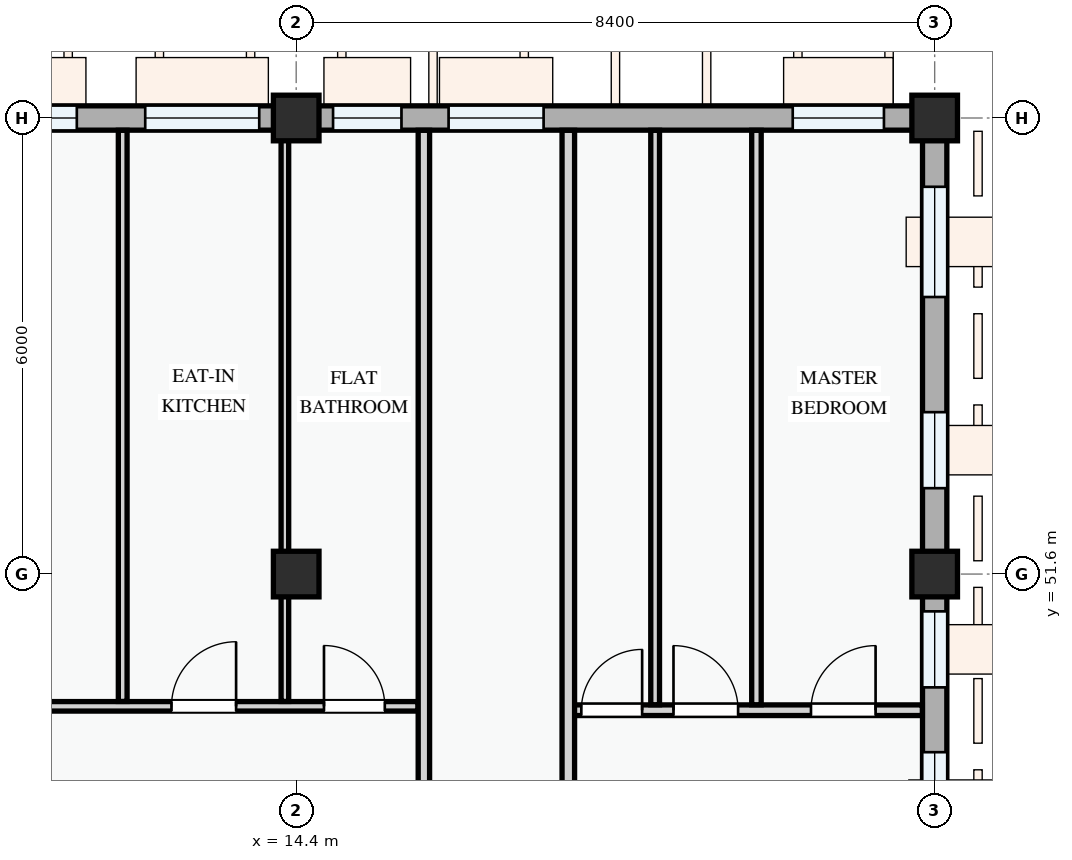
"""IFC4 building model, lengths in metres.
Left out: names, types, materials, properties, quantities, classifications, styles, units other than length and angle.
Written with IfcOpenShell. Run it as: python <this file> out.ifc"""

import sys

from ifc_helpers import new_model, si_unit, direction, frame, frame_2d, origin, origin_2d, place, context, subcontext, project, spatial, rectangle, extrude, element, fill, save


model = new_model("IFC4")
c1 = context("Model", 3, precision=1e-05, world=origin(), true_north=direction((0.0, 1.0)))
c2 = subcontext(c1, "Body", "Model", "MODEL_VIEW")
j1 = project(units=[si_unit("LENGTHUNIT", "METRE"), si_unit("PLANEANGLEUNIT", "RADIAN")], contexts=[c1])
p1 = place(None, origin())
s1 = spatial("IfcSite", under=j1, at=p1, CompositionType="ELEMENT")
p2 = place(p1, origin())
s2 = spatial("IfcBuilding", under=s1, at=p2, CompositionType="ELEMENT")
p3 = place(p2, frame((0.0, 0.0, 14.7)))
s3 = spatial("IfcBuildingStorey", under=s2, at=p3, CompositionType="ELEMENT", Elevation=14.7)
for number, where, z_axis, x_axis in (
    (1, (14.4, 51.6, 0.0), (0.0, 0.0, 1.0), (1.0, 0.0, 0.0)),
    (2, (14.4, 57.6, 0.0), (0.0, 0.0, 1.0), (1.0, 0.0, 0.0)),
    (3, (22.8, 51.6, 0.0), (0.0, 0.0, 1.0), (1.0, 0.0, 0.0)),
    (4, (22.8, 57.6, 0.0), (0.0, 0.0, 1.0), (1.0, 0.0, 0.0)),
):
    element("IfcColumn", number, at=place(p3, frame(where, z_axis=z_axis, x_axis=x_axis)), inside=s3, PredefinedType="COLUMN", context=c2, shape_type="SweptSolid", body=[
        extrude(rectangle(XDim=0.6, YDim=0.6, at=origin_2d()), origin(), (0.0, 0.0, 1.0), 3.3),
    ])
p4 = place(p3, frame((22.8, 43.2, 0.0), z_axis=(0.0, 0.0, 1.0), x_axis=(0.0, 1.0, 0.0)))
e5 = element("IfcWall", 5, at=p4, inside=s3, PredefinedType="STANDARD", context=c2, shape_type="SweptSolid", body=[
    extrude(rectangle(XDim=8.4, YDim=0.32, at=frame_2d((4.2, 0.0))), origin(), (0.0, 0.0, 1.0), 2.425),
])
p5 = place(p4, frame((0.535, 0.0, 0.78)))
e6 = element("IfcOpeningElement", 6, at=p5, cuts=e5, PredefinedType="OPENING", context=c2, shape_type="SweptSolid", body=[
    extrude(rectangle(XDim=0.9, YDim=1.2, at=frame_2d((0.45, 0.6))), frame((0.0, 0.17, 0.0), z_axis=(0.0, -1.0, 0.0), x_axis=(1.0, 0.0, 0.0)), (0.0, 0.0, 1.0), 0.34),
])
p6 = place(p4, frame((2.122, 0.0, 0.78)))
e7 = element("IfcOpeningElement", 7, at=p6, cuts=e5, PredefinedType="OPENING", context=c2, shape_type="SweptSolid", body=[
    extrude(rectangle(XDim=1.8, YDim=1.5, at=frame_2d((0.9, 0.75))), frame((0.0, 0.17, 0.0), z_axis=(0.0, -1.0, 0.0), x_axis=(1.0, 0.0, 0.0)), (0.0, 0.0, 1.0), 0.34),
])
p7 = place(p4, frame((4.677, 0.0, 0.78)))
e8 = element("IfcOpeningElement", 8, at=p7, cuts=e5, PredefinedType="OPENING", context=c2, shape_type="SweptSolid", body=[
    extrude(rectangle(XDim=1.38, YDim=1.48, at=frame_2d((0.69, 0.74))), frame((0.0, 0.17, 0.0), z_axis=(0.0, -1.0, 0.0), x_axis=(1.0, 0.0, 0.0)), (0.0, 0.0, 1.0), 0.34),
])
p8 = place(p4, frame((6.909, 0.0, 0.78)))
e9 = element("IfcOpeningElement", 9, at=p8, cuts=e5, PredefinedType="OPENING", context=c2, shape_type="SweptSolid", body=[
    extrude(rectangle(XDim=1.0, YDim=1.25, at=frame_2d((0.5, 0.625))), frame((0.0, 0.17, 0.0), z_axis=(0.0, -1.0, 0.0), x_axis=(1.0, 0.0, 0.0)), (0.0, 0.0, 1.0), 0.34),
])
p9 = place(p3, frame((22.8, 51.6, 0.0), z_axis=(0.0, 0.0, 1.0), x_axis=(0.0, 1.0, 0.0)))
e10 = element("IfcWall", 10, at=p9, inside=s3, PredefinedType="STANDARD", context=c2, shape_type="SweptSolid", body=[
    extrude(rectangle(XDim=6.0, YDim=0.32, at=frame_2d((3.0, 0.0))), origin(), (0.0, 0.0, 1.0), 2.575),
])
p10 = place(p9, frame((1.13, 0.0, 0.78)))
e11 = element("IfcOpeningElement", 11, at=p10, cuts=e10, PredefinedType="OPENING", context=c2, shape_type="SweptSolid", body=[
    extrude(rectangle(XDim=1.0, YDim=1.25, at=frame_2d((0.5, 0.625))), frame((0.0, 0.17, 0.0), z_axis=(0.0, -1.0, 0.0), x_axis=(1.0, 0.0, 0.0)), (0.0, 0.0, 1.0), 0.34),
])
p11 = place(p9, frame((3.645, 0.0, 0.78)))
e12 = element("IfcOpeningElement", 12, at=p11, cuts=e10, PredefinedType="OPENING", context=c2, shape_type="SweptSolid", body=[
    extrude(rectangle(XDim=1.45, YDim=1.6, at=frame_2d((0.725, 0.8))), frame((0.0, 0.17, 0.0), z_axis=(0.0, -1.0, 0.0), x_axis=(1.0, 0.0, 0.0)), (0.0, 0.0, 1.0), 0.34),
])
p12 = place(p3, frame((22.8, 57.6, 0.0), z_axis=(0.0, 0.0, 1.0), x_axis=(-1.0, 0.0, 0.0)))
e13 = element("IfcWall", 13, at=p12, inside=s3, PredefinedType="STANDARD", context=c2, shape_type="SweptSolid", body=[
    extrude(rectangle(XDim=8.4, YDim=0.32, at=frame_2d((4.2, 0.0))), origin(), (0.0, 0.0, 1.0), 2.375),
])
p13 = place(p12, frame((0.667, 0.0, 0.78)))
e14 = element("IfcOpeningElement", 14, at=p13, cuts=e13, PredefinedType="OPENING", context=c2, shape_type="SweptSolid", body=[
    extrude(rectangle(XDim=1.2, YDim=1.35, at=frame_2d((0.6, 0.675))), frame((0.0, 0.17, 0.0), z_axis=(0.0, -1.0, 0.0), x_axis=(1.0, 0.0, 0.0)), (0.0, 0.0, 1.0), 0.34),
])
p14 = place(p12, frame((5.145, 0.0, 0.78)))
e15 = element("IfcOpeningElement", 15, at=p14, cuts=e13, PredefinedType="OPENING", context=c2, shape_type="SweptSolid", body=[
    extrude(rectangle(XDim=1.25, YDim=1.3, at=frame_2d((0.625, 0.65))), frame((0.0, 0.17, 0.0), z_axis=(0.0, -1.0, 0.0), x_axis=(1.0, 0.0, 0.0)), (0.0, 0.0, 1.0), 0.34),
])
p15 = place(p12, frame((7.015, 0.0, 0.78)))
e16 = element("IfcOpeningElement", 16, at=p15, cuts=e13, PredefinedType="OPENING", context=c2, shape_type="SweptSolid", body=[
    extrude(rectangle(XDim=0.9, YDim=1.2, at=frame_2d((0.45, 0.6))), frame((0.0, 0.17, 0.0), z_axis=(0.0, -1.0, 0.0), x_axis=(1.0, 0.0, 0.0)), (0.0, 0.0, 1.0), 0.34),
])
p16 = place(p3, frame((14.4, 57.6, 0.0), z_axis=(0.0, 0.0, 1.0), x_axis=(-1.0, 0.0, 0.0)))
e17 = element("IfcWall", 17, at=p16, inside=s3, PredefinedType="STANDARD", context=c2, shape_type="SweptSolid", body=[
    extrude(rectangle(XDim=6.0, YDim=0.32, at=frame_2d((3.0, 0.0))), origin(), (0.0, 0.0, 1.0), 2.475),
])
p17 = place(p16, frame((0.486, 0.0, 0.78)))
e18 = element("IfcOpeningElement", 18, at=p17, cuts=e17, PredefinedType="OPENING", context=c2, shape_type="SweptSolid", body=[
    extrude(rectangle(XDim=1.5, YDim=1.5, at=frame_2d((0.75, 0.75))), frame((0.0, 0.17, 0.0), z_axis=(0.0, -1.0, 0.0), x_axis=(1.0, 0.0, 0.0)), (0.0, 0.0, 1.0), 0.34),
])
p18 = place(p16, frame((2.886, 0.0, 0.78)))
e19 = element("IfcOpeningElement", 19, at=p18, cuts=e17, PredefinedType="OPENING", context=c2, shape_type="SweptSolid", body=[
    extrude(rectangle(XDim=2.32, YDim=1.5, at=frame_2d((1.16, 0.75))), frame((0.0, 0.17, 0.0), z_axis=(0.0, -1.0, 0.0), x_axis=(1.0, 0.0, 0.0)), (0.0, 0.0, 1.0), 0.34),
])
p19 = place(p3, frame((8.562, 49.86, 0.0), z_axis=(0.0, 0.0, 1.0), x_axis=(1.0, 0.0, 0.0)))
e20 = element("IfcWall", 20, at=p19, inside=s3, PredefinedType="PARTITIONING", context=c2, shape_type="SweptSolid", body=[
    extrude(rectangle(XDim=7.441, YDim=0.125, at=frame_2d((3.72, 0.0))), origin(), (0.0, 0.0, 1.0), 3.0),
])
p20 = place(p19, frame((1.302, 0.0, 0.0)))
e21 = element("IfcOpeningElement", 21, at=p20, cuts=e20, PredefinedType="OPENING", context=c2, shape_type="SweptSolid", body=[
    extrude(rectangle(XDim=0.85, YDim=2.1, at=frame_2d((0.425, 1.05))), frame((0.0, 0.073, 0.0), z_axis=(0.0, -1.0, 0.0), x_axis=(1.0, 0.0, 0.0)), (0.0, 0.0, 1.0), 0.145),
])
p21 = place(p19, frame((4.198, 0.0, 0.0)))
e22 = element("IfcOpeningElement", 22, at=p21, cuts=e20, PredefinedType="OPENING", context=c2, shape_type="SweptSolid", body=[
    extrude(rectangle(XDim=0.85, YDim=2.1, at=frame_2d((0.425, 1.05))), frame((0.0, 0.073, 0.0), z_axis=(0.0, -1.0, 0.0), x_axis=(1.0, 0.0, 0.0)), (0.0, 0.0, 1.0), 0.145),
])
p22 = place(p19, frame((6.204, 0.0, 0.0)))
e23 = element("IfcOpeningElement", 23, at=p22, cuts=e20, PredefinedType="OPENING", context=c2, shape_type="SweptSolid", body=[
    extrude(rectangle(XDim=0.8, YDim=2.1, at=frame_2d((0.4, 1.05))), frame((0.0, 0.073, 0.0), z_axis=(0.0, -1.0, 0.0), x_axis=(1.0, 0.0, 0.0)), (0.0, 0.0, 1.0), 0.145),
])
p23 = place(p3, frame((12.118, 49.925, 0.0), z_axis=(0.0, 0.0, 1.0), x_axis=(0.0, 1.0, 0.0)))
e24 = element("IfcWall", 24, at=p23, inside=s3, PredefinedType="PARTITIONING", context=c2, shape_type="SweptSolid", body=[
    extrude(rectangle(XDim=7.513, YDim=0.115, at=frame_2d((3.757, 0.0))), origin(), (0.0, 0.0, 1.0), 3.0),
])
p24 = place(p3, frame((14.251, 49.925, 0.0), z_axis=(0.0, 0.0, 1.0), x_axis=(0.0, 1.0, 0.0)))
e25 = element("IfcWall", 25, at=p24, inside=s3, PredefinedType="PARTITIONING", context=c2, shape_type="SweptSolid", body=[
    extrude(rectangle(XDim=7.513, YDim=0.1, at=frame_2d((3.757, 0.0))), origin(), (0.0, 0.0, 1.0), 2.425),
])
p25 = place(p3, frame((17.98, 49.809, 0.0), z_axis=(0.0, 0.0, 1.0), x_axis=(1.0, 0.0, 0.0)))
e26 = element("IfcWall", 26, at=p25, inside=s3, PredefinedType="PARTITIONING", context=c2, shape_type="SweptSolid", body=[
    extrude(rectangle(XDim=4.658, YDim=0.14, at=frame_2d((2.329, 0.0))), origin(), (0.0, 0.0, 1.0), 3.0),
])
p26 = place(p25, frame((0.171, 0.0, 0.0)))
e27 = element("IfcOpeningElement", 27, at=p26, cuts=e26, PredefinedType="OPENING", context=c2, shape_type="SweptSolid", body=[
    extrude(rectangle(XDim=0.8, YDim=2.1, at=frame_2d((0.4, 1.05))), frame((0.0, 0.08, 0.0), z_axis=(0.0, -1.0, 0.0), x_axis=(1.0, 0.0, 0.0)), (0.0, 0.0, 1.0), 0.16),
])
p27 = place(p25, frame((1.384, 0.0, 0.0)))
e28 = element("IfcOpeningElement", 28, at=p27, cuts=e26, PredefinedType="OPENING", context=c2, shape_type="SweptSolid", body=[
    extrude(rectangle(XDim=0.85, YDim=2.1, at=frame_2d((0.425, 1.05))), frame((0.0, 0.08, 0.0), z_axis=(0.0, -1.0, 0.0), x_axis=(1.0, 0.0, 0.0)), (0.0, 0.0, 1.0), 0.16),
])
p28 = place(p25, frame((3.193, 0.0, 0.0)))
e29 = element("IfcOpeningElement", 29, at=p28, cuts=e26, PredefinedType="OPENING", context=c2, shape_type="SweptSolid", body=[
    extrude(rectangle(XDim=0.85, YDim=2.1, at=frame_2d((0.425, 1.05))), frame((0.0, 0.08, 0.0), z_axis=(0.0, -1.0, 0.0), x_axis=(1.0, 0.0, 0.0)), (0.0, 0.0, 1.0), 0.16),
])
p29 = place(p3, frame((20.455, 49.881, 0.0), z_axis=(0.0, 0.0, 1.0), x_axis=(0.0, 1.0, 0.0)))
e30 = element("IfcWall", 30, at=p29, inside=s3, PredefinedType="PARTITIONING", context=c2, shape_type="SweptSolid", body=[
    extrude(rectangle(XDim=7.557, YDim=0.125, at=frame_2d((3.779, 0.0))), origin(), (0.0, 0.0, 1.0), 3.0),
])
p30 = place(p3, frame((19.122, 49.881, 0.0), z_axis=(0.0, 0.0, 1.0), x_axis=(0.0, 1.0, 0.0)))
e31 = element("IfcWall", 31, at=p30, inside=s3, PredefinedType="PARTITIONING", context=c2, shape_type="SweptSolid", body=[
    extrude(rectangle(XDim=7.557, YDim=0.115, at=frame_2d((3.779, 0.0))), origin(), (0.0, 0.0, 1.0), 3.0),
])
p31 = place(p3, frame((16.08, 22.66, 0.0), z_axis=(0.0, 0.0, 1.0), x_axis=(0.0, 1.0, 0.0)))
e32 = element("IfcWall", 32, at=p31, inside=s3, PredefinedType="PARTITIONING", context=c2, shape_type="SweptSolid", body=[
    extrude(rectangle(XDim=34.778, YDim=0.15, at=frame_2d((17.389, 0.0))), origin(), (0.0, 0.0, 1.0), 3.0),
])
p32 = place(p31, frame((2.672, 0.0, 0.0)))
e33 = element("IfcOpeningElement", 33, at=p32, cuts=e32, PredefinedType="OPENING", context=c2, shape_type="SweptSolid", body=[
    extrude(rectangle(XDim=0.92, YDim=2.1, at=frame_2d((0.46, 1.05))), frame((0.0, 0.085, 0.0), z_axis=(0.0, -1.0, 0.0), x_axis=(1.0, 0.0, 0.0)), (0.0, 0.0, 1.0), 0.17),
])
p33 = place(p31, frame((10.71, 0.0, 0.0)))
e34 = element("IfcOpeningElement", 34, at=p33, cuts=e32, PredefinedType="OPENING", context=c2, shape_type="SweptSolid", body=[
    extrude(rectangle(XDim=0.92, YDim=2.1, at=frame_2d((0.46, 1.05))), frame((0.0, 0.085, 0.0), z_axis=(0.0, -1.0, 0.0), x_axis=(1.0, 0.0, 0.0)), (0.0, 0.0, 1.0), 0.17),
])
p34 = place(p31, frame((24.28, 0.0, 0.0)))
e35 = element("IfcOpeningElement", 35, at=p34, cuts=e32, PredefinedType="OPENING", context=c2, shape_type="SweptSolid", body=[
    extrude(rectangle(XDim=0.92, YDim=2.1, at=frame_2d((0.46, 1.05))), frame((0.0, 0.085, 0.0), z_axis=(0.0, -1.0, 0.0), x_axis=(1.0, 0.0, 0.0)), (0.0, 0.0, 1.0), 0.17),
])
p35 = place(p3, frame((17.98, 22.66, 0.0), z_axis=(0.0, 0.0, 1.0), x_axis=(0.0, 1.0, 0.0)))
e36 = element("IfcWall", 36, at=p35, inside=s3, PredefinedType="PARTITIONING", context=c2, shape_type="SweptSolid", body=[
    extrude(rectangle(XDim=34.778, YDim=0.165, at=frame_2d((17.389, 0.0))), origin(), (0.0, 0.0, 1.0), 3.0),
])
p36 = place(p35, frame((2.664, 0.0, 0.0)))
e37 = element("IfcOpeningElement", 37, at=p36, cuts=e36, PredefinedType="OPENING", context=c2, shape_type="SweptSolid", body=[
    extrude(rectangle(XDim=0.92, YDim=2.1, at=frame_2d((0.46, 1.05))), frame((0.0, 0.093, 0.0), z_axis=(0.0, -1.0, 0.0), x_axis=(1.0, 0.0, 0.0)), (0.0, 0.0, 1.0), 0.185),
])
p37 = place(p35, frame((10.71, 0.0, 0.0)))
e38 = element("IfcOpeningElement", 38, at=p37, cuts=e36, PredefinedType="OPENING", context=c2, shape_type="SweptSolid", body=[
    extrude(rectangle(XDim=0.96, YDim=2.12, at=frame_2d((0.48, 1.06))), frame((0.0, 0.093, 0.0), z_axis=(0.0, -1.0, 0.0), x_axis=(1.0, 0.0, 0.0)), (0.0, 0.0, 1.0), 0.185),
])
p38 = place(p35, frame((24.254, 0.0, 0.0)))
e39 = element("IfcOpeningElement", 39, at=p38, cuts=e36, PredefinedType="OPENING", context=c2, shape_type="SweptSolid", body=[
    extrude(rectangle(XDim=0.92, YDim=2.1, at=frame_2d((0.46, 1.05))), frame((0.0, 0.093, 0.0), z_axis=(0.0, -1.0, 0.0), x_axis=(1.0, 0.0, 0.0)), (0.0, 0.0, 1.0), 0.185),
])
p39 = place(p7, origin())
e40 = element("IfcWindow", 40, at=p39, inside=s3, PartitioningType="SINGLE_PANEL", PredefinedType="WINDOW", context=c2, shape_type="SweptSolid", body=[
    extrude(rectangle(XDim=1.38, YDim=1.48, at=frame_2d((0.69, 0.74))), frame((0.0, 0.03, 0.0), z_axis=(0.0, -1.0, 0.0), x_axis=(1.0, 0.0, 0.0)), (0.0, 0.0, 1.0), 0.06),
])
fill(e8, e40)
p40 = place(p8, origin())
e41 = element("IfcWindow", 41, at=p40, inside=s3, PartitioningType="SINGLE_PANEL", PredefinedType="WINDOW", context=c2, shape_type="SweptSolid", body=[
    extrude(rectangle(XDim=1.0, YDim=1.25, at=frame_2d((0.5, 0.625))), frame((0.0, 0.03, 0.0), z_axis=(0.0, -1.0, 0.0), x_axis=(1.0, 0.0, 0.0)), (0.0, 0.0, 1.0), 0.06),
])
fill(e9, e41)
p41 = place(p10, origin())
e42 = element("IfcWindow", 42, at=p41, inside=s3, PartitioningType="SINGLE_PANEL", PredefinedType="WINDOW", context=c2, shape_type="SweptSolid", body=[
    extrude(rectangle(XDim=1.0, YDim=1.25, at=frame_2d((0.5, 0.625))), frame((0.0, 0.03, 0.0), z_axis=(0.0, -1.0, 0.0), x_axis=(1.0, 0.0, 0.0)), (0.0, 0.0, 1.0), 0.06),
])
fill(e11, e42)
p42 = place(p11, origin())
e43 = element("IfcWindow", 43, at=p42, inside=s3, PartitioningType="SINGLE_PANEL", PredefinedType="WINDOW", context=c2, shape_type="SweptSolid", body=[
    extrude(rectangle(XDim=1.45, YDim=1.6, at=frame_2d((0.725, 0.8))), frame((0.0, 0.03, 0.0), z_axis=(0.0, -1.0, 0.0), x_axis=(1.0, 0.0, 0.0)), (0.0, 0.0, 1.0), 0.06),
])
fill(e12, e43)
p43 = place(p13, origin())
e44 = element("IfcWindow", 44, at=p43, inside=s3, PartitioningType="SINGLE_PANEL", PredefinedType="WINDOW", context=c2, shape_type="SweptSolid", body=[
    extrude(rectangle(XDim=1.2, YDim=1.35, at=frame_2d((0.6, 0.675))), frame((0.0, 0.03, 0.0), z_axis=(0.0, -1.0, 0.0), x_axis=(1.0, 0.0, 0.0)), (0.0, 0.0, 1.0), 0.06),
])
fill(e14, e44)
p44 = place(p14, origin())
e45 = element("IfcWindow", 45, at=p44, inside=s3, PartitioningType="SINGLE_PANEL", PredefinedType="WINDOW", context=c2, shape_type="SweptSolid", body=[
    extrude(rectangle(XDim=1.25, YDim=1.3, at=frame_2d((0.625, 0.65))), frame((0.0, 0.03, 0.0), z_axis=(0.0, -1.0, 0.0), x_axis=(1.0, 0.0, 0.0)), (0.0, 0.0, 1.0), 0.06),
])
fill(e15, e45)
p45 = place(p15, origin())
e46 = element("IfcWindow", 46, at=p45, inside=s3, PartitioningType="SINGLE_PANEL", PredefinedType="WINDOW", context=c2, shape_type="SweptSolid", body=[
    extrude(rectangle(XDim=0.9, YDim=1.2, at=frame_2d((0.45, 0.6))), frame((0.0, 0.03, 0.0), z_axis=(0.0, -1.0, 0.0), x_axis=(1.0, 0.0, 0.0)), (0.0, 0.0, 1.0), 0.06),
])
fill(e16, e46)
p46 = place(p17, origin())
e47 = element("IfcWindow", 47, at=p46, inside=s3, PartitioningType="SINGLE_PANEL", PredefinedType="WINDOW", context=c2, shape_type="SweptSolid", body=[
    extrude(rectangle(XDim=1.5, YDim=1.5, at=frame_2d((0.75, 0.75))), frame((0.0, 0.03, 0.0), z_axis=(0.0, -1.0, 0.0), x_axis=(1.0, 0.0, 0.0)), (0.0, 0.0, 1.0), 0.06),
])
fill(e18, e47)
p47 = place(p18, origin())
e48 = element("IfcWindow", 48, at=p47, inside=s3, PartitioningType="DOUBLE_PANEL_VERTICAL", PredefinedType="WINDOW", context=c2, shape_type="SweptSolid", body=[
    extrude(rectangle(XDim=2.32, YDim=1.5, at=frame_2d((1.16, 0.75))), frame((0.0, 0.03, 0.0), z_axis=(0.0, -1.0, 0.0), x_axis=(1.0, 0.0, 0.0)), (0.0, 0.0, 1.0), 0.06),
])
fill(e19, e48)
p48 = place(p21, origin())
e49 = element("IfcDoor", 49, at=p48, inside=s3, OperationType="SINGLE_SWING_RIGHT", PredefinedType="DOOR", context=c2, shape_type="SweptSolid", body=[
    extrude(rectangle(XDim=0.85, YDim=2.1, at=frame_2d((0.425, 1.05))), frame((0.0, 0.025, 0.0), z_axis=(0.0, -1.0, 0.0), x_axis=(1.0, 0.0, 0.0)), (0.0, 0.0, 1.0), 0.05),
])
fill(e22, e49)
p49 = place(p22, origin())
e50 = element("IfcDoor", 50, at=p49, inside=s3, OperationType="SINGLE_SWING_LEFT", PredefinedType="DOOR", context=c2, shape_type="SweptSolid", body=[
    extrude(rectangle(XDim=0.8, YDim=2.1, at=frame_2d((0.4, 1.05))), frame((0.0, 0.025, 0.0), z_axis=(0.0, -1.0, 0.0), x_axis=(1.0, 0.0, 0.0)), (0.0, 0.0, 1.0), 0.05),
])
fill(e23, e50)
p50 = place(p26, origin())
e51 = element("IfcDoor", 51, at=p50, inside=s3, OperationType="SINGLE_SWING_RIGHT", PredefinedType="DOOR", context=c2, shape_type="SweptSolid", body=[
    extrude(rectangle(XDim=0.8, YDim=2.1, at=frame_2d((0.4, 1.05))), frame((0.0, 0.025, 0.0), z_axis=(0.0, -1.0, 0.0), x_axis=(1.0, 0.0, 0.0)), (0.0, 0.0, 1.0), 0.05),
])
fill(e27, e51)
p51 = place(p27, origin())
e52 = element("IfcDoor", 52, at=p51, inside=s3, OperationType="SINGLE_SWING_LEFT", PredefinedType="DOOR", context=c2, shape_type="SweptSolid", body=[
    extrude(rectangle(XDim=0.85, YDim=2.1, at=frame_2d((0.425, 1.05))), frame((0.0, 0.025, 0.0), z_axis=(0.0, -1.0, 0.0), x_axis=(1.0, 0.0, 0.0)), (0.0, 0.0, 1.0), 0.05),
])
fill(e28, e52)
p52 = place(p28, origin())
e53 = element("IfcDoor", 53, at=p52, inside=s3, OperationType="SINGLE_SWING_RIGHT", PredefinedType="DOOR", context=c2, shape_type="SweptSolid", body=[
    extrude(rectangle(XDim=0.85, YDim=2.1, at=frame_2d((0.425, 1.05))), frame((0.0, 0.025, 0.0), z_axis=(0.0, -1.0, 0.0), x_axis=(1.0, 0.0, 0.0)), (0.0, 0.0, 1.0), 0.05),
])
fill(e29, e53)
save(model, sys.argv[1])
